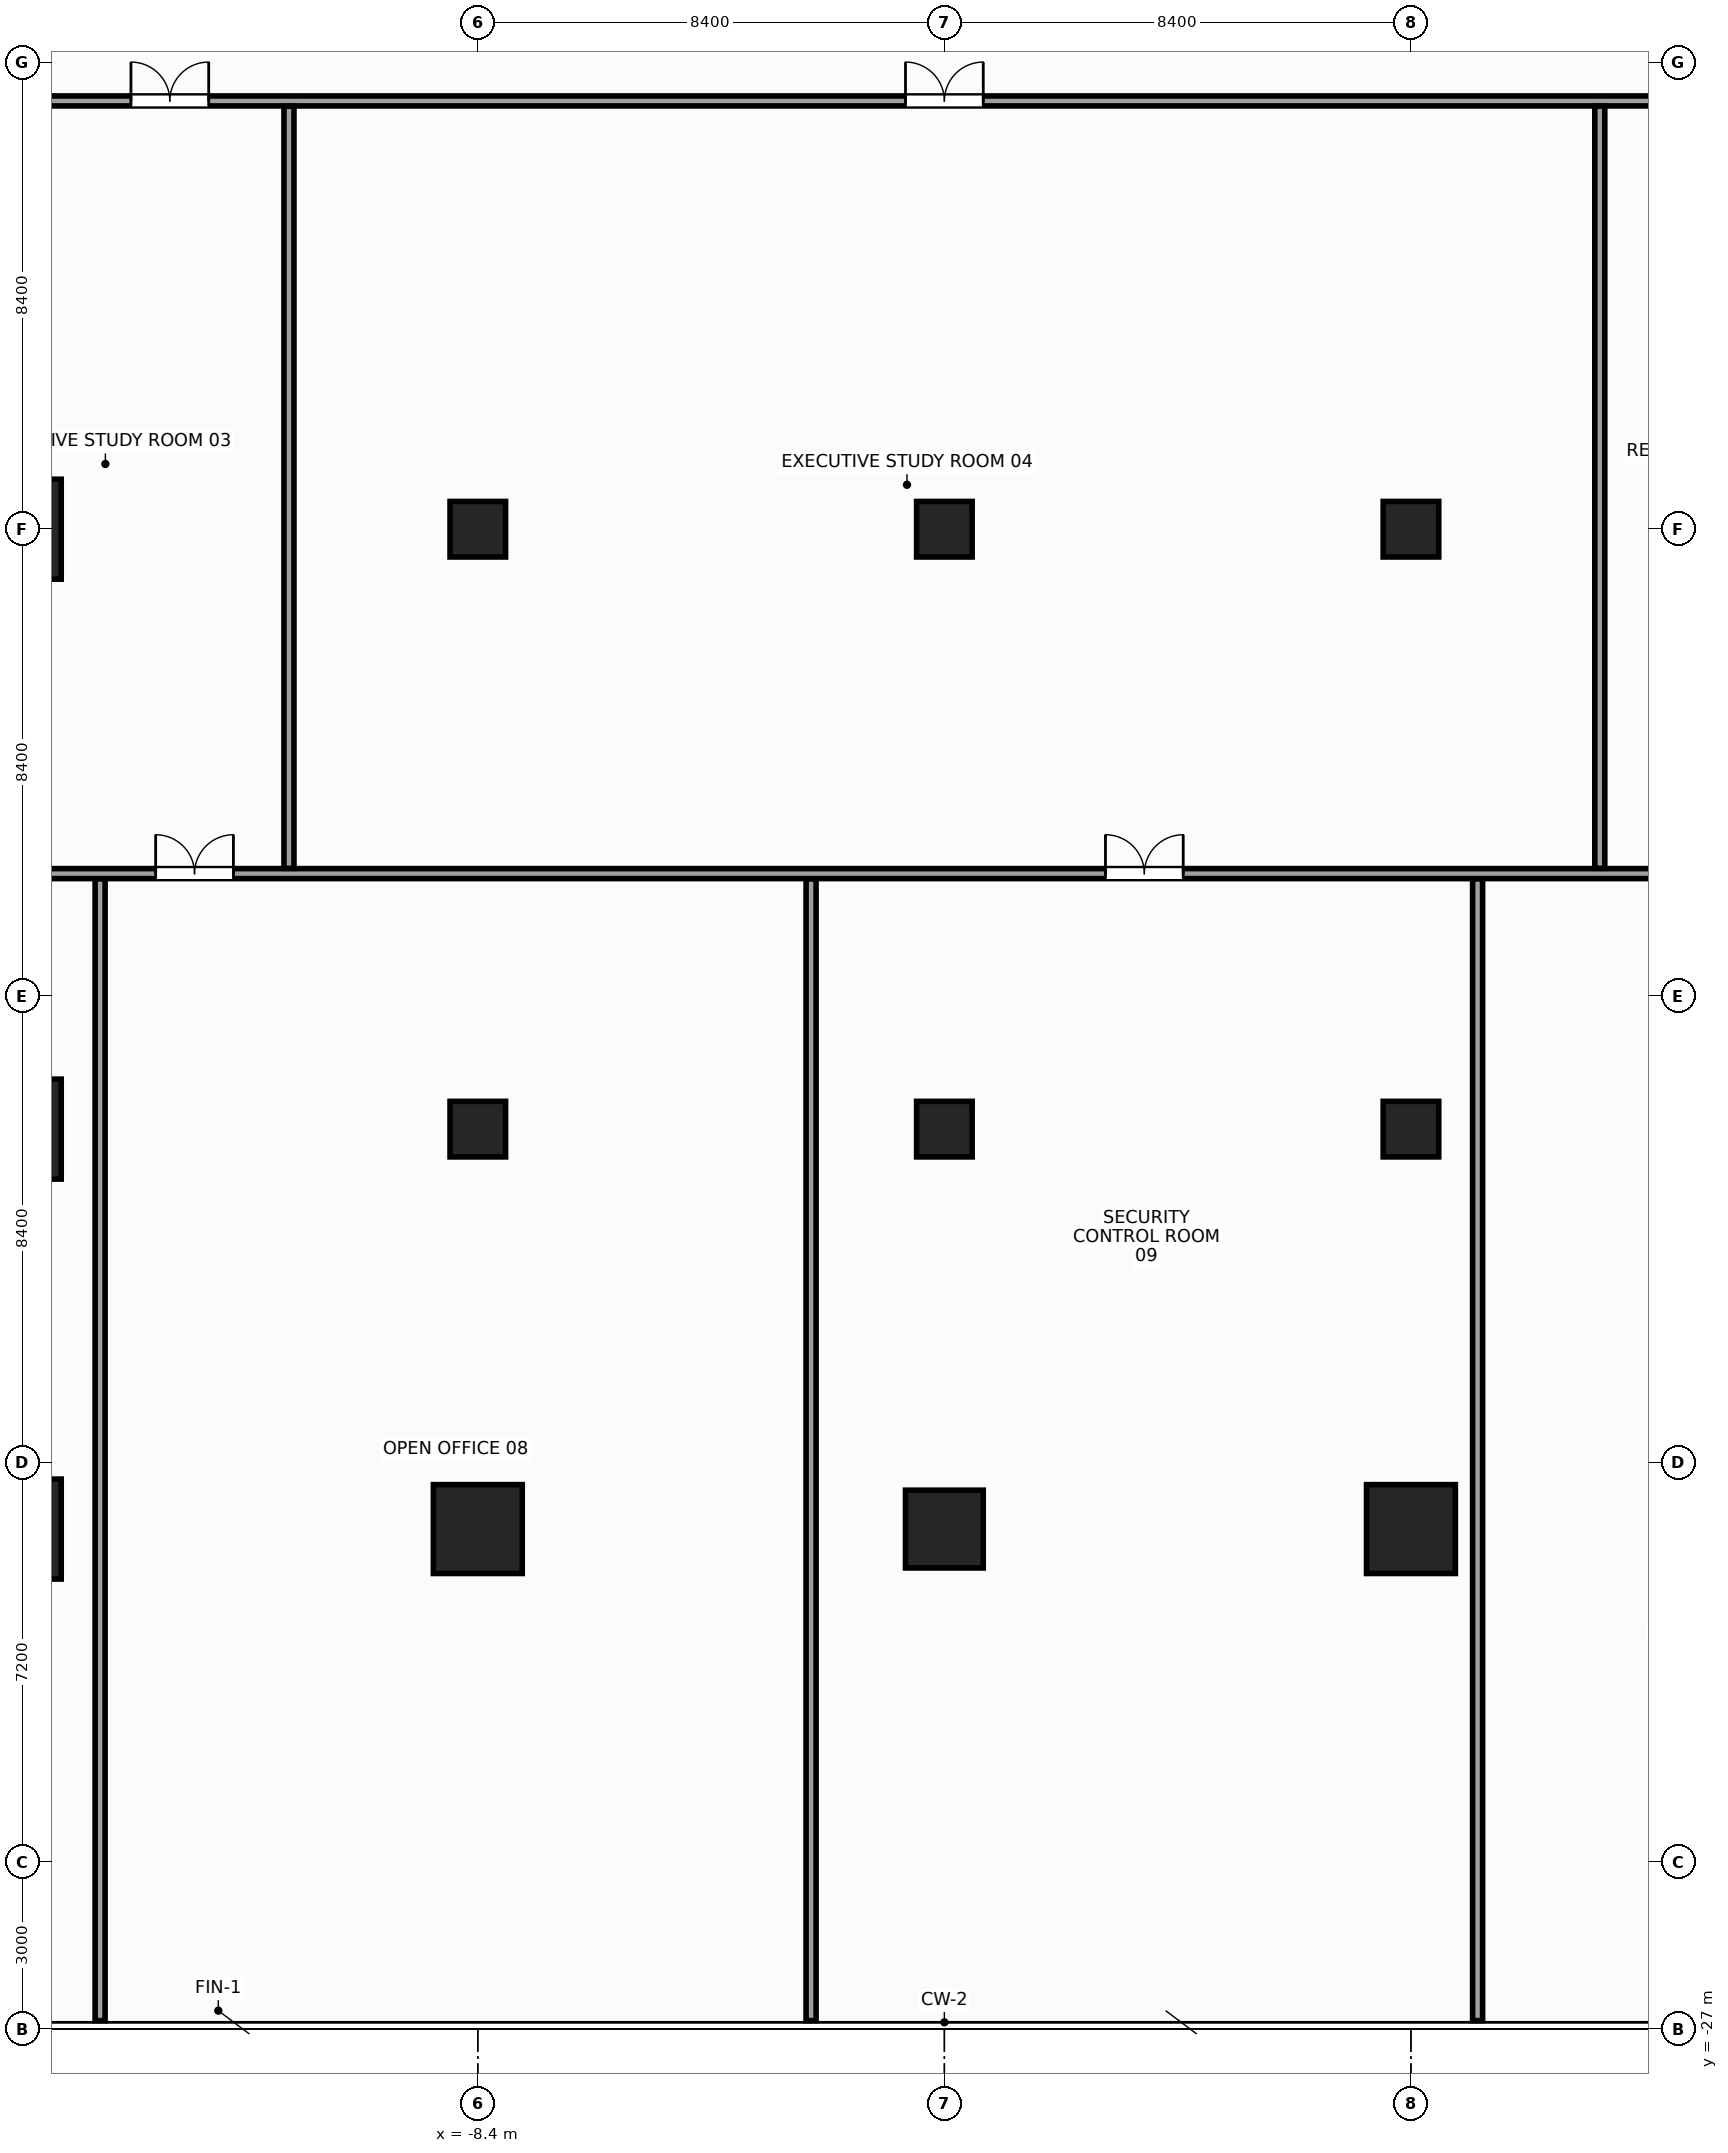
"""IFC4 building model, lengths in metres.
Left out: names, types, materials, properties, quantities, classifications, styles, units other than length and angle.
Written with IfcOpenShell. Run it as: python <this file> out.ifc"""

import sys

from ifc_helpers import new_model, si_unit, direction, frame, frame_2d, origin, origin_2d, place, context, subcontext, project, spatial, rectangle, hollow_rectangle, extrude, source, transform, mapped, element, fill, save


model = new_model("IFC4")
c1 = context("Model", 3, precision=1e-05, world=origin(), true_north=direction((0.0, 1.0)))
c2 = subcontext(c1, "Body", "Model", "MODEL_VIEW")
j1 = project(units=[si_unit("LENGTHUNIT", "METRE"), si_unit("PLANEANGLEUNIT", "RADIAN")], contexts=[c1])
p1 = place(None, origin())
s1 = spatial("IfcSite", under=j1, at=p1, CompositionType="ELEMENT")
p2 = place(p1, origin())
s2 = spatial("IfcBuilding", under=s1, at=p2, CompositionType="ELEMENT")
p3 = place(p2, frame((0.0, 0.0, 66.8)))
s3 = spatial("IfcBuildingStorey", under=s2, at=p3, CompositionType="ELEMENT", Elevation=66.8)
m1 = source(origin(), c2, "Body", "SweptSolid", [
    extrude(rectangle(XDim=1.8, YDim=1.8, at=origin_2d()), origin(), (0.0, 0.0, 1.0), 3.6),
])
for number, where, z_axis, x_axis in (
    (1, (-16.8, -18.0, 0.0), (0.0, 0.0, 1.0), (1.0, 0.0, 0.0)),
    (2, (-16.8, -10.8, 0.0), (0.0, 0.0, 1.0), (1.0, 0.0, 0.0)),
    (3, (-16.8, 0.0, 0.0), (0.0, 0.0, 1.0), (1.0, 0.0, 0.0)),
):
    element("IfcColumn", number, at=place(p3, frame(where, z_axis=z_axis, x_axis=x_axis)), inside=s3, PredefinedType="COLUMN", context=c2, shape_type="MappedRepresentation", body=[
        mapped(m1, transform((0.0, 0.0, 0.0), x_axis=(1.0, 0.0, 0.0), y_axis=(0.0, 1.0, 0.0), z_axis=(0.0, 0.0, 1.0), scale=1.0)),
    ])
m2 = source(origin(), c2, "Body", "SweptSolid", [
    extrude(rectangle(XDim=1.6, YDim=1.6, at=origin_2d()), origin(), (0.0, 0.0, 1.0), 3.6),
])
p4 = place(p3, frame((-8.4, -18.0, 0.0), z_axis=(0.0, 0.0, 1.0), x_axis=(1.0, 0.0, 0.0)))
e4 = element("IfcColumn", 4, at=p4, inside=s3, PredefinedType="COLUMN", context=c2, shape_type="MappedRepresentation", body=[
    mapped(m2, transform((0.0, 0.0, 0.0), x_axis=(1.0, 0.0, 0.0), y_axis=(0.0, 1.0, 0.0), z_axis=(0.0, 0.0, 1.0), scale=1.0)),
])
m3 = source(origin(), c2, "Body", "SweptSolid", [
    extrude(hollow_rectangle(XDim=1.0, YDim=1.0, WallThickness=0.045, at=origin_2d()), origin(), (0.0, 0.0, 1.0), 3.6),
])
for number, where, z_axis, x_axis in (
    (5, (-8.4, 0.0, 0.0), (0.0, 0.0, 1.0), (1.0, 0.0, 0.0)),
    (6, (-8.4, -10.8, 0.0), (0.0, 0.0, 1.0), (1.0, 0.0, 0.0)),
):
    element("IfcColumn", number, at=place(p3, frame(where, z_axis=z_axis, x_axis=x_axis)), inside=s3, PredefinedType="COLUMN", context=c2, shape_type="MappedRepresentation", body=[
        mapped(m3, transform((0.0, 0.0, 0.0), x_axis=(1.0, 0.0, 0.0), y_axis=(0.0, 1.0, 0.0), z_axis=(0.0, 0.0, 1.0), scale=1.0)),
    ])
p5 = place(p3, frame((8.4, -18.0, 0.0), z_axis=(0.0, 0.0, 1.0), x_axis=(1.0, 0.0, 0.0)))
e7 = element("IfcColumn", 7, at=p5, inside=s3, PredefinedType="COLUMN", context=c2, shape_type="MappedRepresentation", body=[
    mapped(m2, transform((0.0, 0.0, 0.0), x_axis=(1.0, 0.0, 0.0), y_axis=(0.0, 1.0, 0.0), z_axis=(0.0, 0.0, 1.0), scale=1.0)),
])
for number, where, z_axis, x_axis in (
    (8, (8.4, 0.0, 0.0), (0.0, 0.0, 1.0), (1.0, 0.0, 0.0)),
    (9, (8.4, -10.8, 0.0), (0.0, 0.0, 1.0), (1.0, 0.0, 0.0)),
):
    element("IfcColumn", number, at=place(p3, frame(where, z_axis=z_axis, x_axis=x_axis)), inside=s3, PredefinedType="COLUMN", context=c2, shape_type="MappedRepresentation", body=[
        mapped(m3, transform((0.0, 0.0, 0.0), x_axis=(1.0, 0.0, 0.0), y_axis=(0.0, 1.0, 0.0), z_axis=(0.0, 0.0, 1.0), scale=1.0)),
    ])
m4 = source(origin(), c2, "Body", "SweptSolid", [
    extrude(rectangle(XDim=1.4, YDim=1.4, at=origin_2d()), origin(), (0.0, 0.0, 1.0), 3.6),
])
p6 = place(p3, frame((0.0, -18.0, 0.0), z_axis=(0.0, 0.0, 1.0), x_axis=(1.0, 0.0, 0.0)))
e10 = element("IfcColumn", 10, at=p6, inside=s3, PredefinedType="COLUMN", context=c2, shape_type="MappedRepresentation", body=[
    mapped(m4, transform((0.0, 0.0, 0.0), x_axis=(1.0, 0.0, 0.0), y_axis=(0.0, 1.0, 0.0), z_axis=(0.0, 0.0, 1.0), scale=1.0)),
])
m5 = source(origin(), c2, "Body", "SweptSolid", [
    extrude(rectangle(XDim=1.0, YDim=1.0, at=origin_2d()), origin(), (0.0, 0.0, 1.0), 3.6),
])
for number, where, z_axis, x_axis in (
    (11, (0.0, -10.8, 0.0), (0.0, 0.0, 1.0), (1.0, 0.0, 0.0)),
    (12, (0.0, 0.0, 0.0), (0.0, 0.0, 1.0), (1.0, 0.0, 0.0)),
):
    element("IfcColumn", number, at=place(p3, frame(where, z_axis=z_axis, x_axis=x_axis)), inside=s3, PredefinedType="COLUMN", context=c2, shape_type="MappedRepresentation", body=[
        mapped(m5, transform((0.0, 0.0, 0.0), x_axis=(1.0, 0.0, 0.0), y_axis=(0.0, 1.0, 0.0), z_axis=(0.0, 0.0, 1.0), scale=1.0)),
    ])
m6 = source(origin(), c2, "Body", "SweptSolid", [
    extrude(rectangle(XDim=36.64, YDim=0.18, at=frame_2d((18.32, 0.0))), origin(), (0.0, 0.0, 1.0), 2.685),
])
p7 = place(p3, frame((-18.32, 7.71, 0.0), z_axis=(0.0, 0.0, 1.0), x_axis=(1.0, 0.0, 0.0)))
e13 = element("IfcWall", 13, at=p7, inside=s3, PredefinedType="PARTITIONING", context=c2, shape_type="MappedRepresentation", body=[
    mapped(m6, transform((0.0, 0.0, 0.0), x_axis=(1.0, 0.0, 0.0), y_axis=(0.0, 1.0, 0.0), z_axis=(0.0, 0.0, 1.0), scale=1.0)),
])
p8 = place(p7, frame((3.675, 0.0, 0.0)))
e14 = element("IfcOpeningElement", 14, at=p8, cuts=e13, PredefinedType="OPENING", context=c2, shape_type="SweptSolid", body=[
    extrude(rectangle(XDim=1.4, YDim=2.2, at=frame_2d((0.7, 1.1))), frame((0.0, 0.102, 0.0), z_axis=(0.0, -1.0, 0.0), x_axis=(1.0, 0.0, 0.0)), (0.0, 0.0, 1.0), 0.204),
])
p9 = place(p7, frame((17.62, 0.0, 0.0)))
e15 = element("IfcOpeningElement", 15, at=p9, cuts=e13, PredefinedType="OPENING", context=c2, shape_type="SweptSolid", body=[
    extrude(rectangle(XDim=1.4, YDim=2.2, at=frame_2d((0.7, 1.1))), frame((0.0, 0.102, 0.0), z_axis=(0.0, -1.0, 0.0), x_axis=(1.0, 0.0, 0.0)), (0.0, 0.0, 1.0), 0.204),
])
p10 = place(p7, frame((32.665, 0.0, 0.0)))
e16 = element("IfcOpeningElement", 16, at=p10, cuts=e13, PredefinedType="OPENING", context=c2, shape_type="SweptSolid", body=[
    extrude(rectangle(XDim=1.4, YDim=2.2, at=frame_2d((0.7, 1.1))), frame((0.0, 0.102, 0.0), z_axis=(0.0, -1.0, 0.0), x_axis=(1.0, 0.0, 0.0)), (0.0, 0.0, 1.0), 0.204),
])
m7 = source(origin(), c2, "Body", "SweptSolid", [
    extrude(rectangle(XDim=36.63, YDim=0.18, at=frame_2d((18.315, 0.0))), origin(), (0.0, 0.0, 1.0), 2.685),
])
p11 = place(p3, frame((-18.315, -6.2, 0.0), z_axis=(0.0, 0.0, 1.0), x_axis=(1.0, 0.0, 0.0)))
e17 = element("IfcWall", 17, at=p11, inside=s3, PredefinedType="PARTITIONING", context=c2, shape_type="MappedRepresentation", body=[
    mapped(m7, transform((0.0, 0.0, 0.0), x_axis=(1.0, 0.0, 0.0), y_axis=(0.0, 1.0, 0.0), z_axis=(0.0, 0.0, 1.0), scale=1.0)),
])
p12 = place(p11, frame((4.115, 0.0, 0.0)))
e18 = element("IfcOpeningElement", 18, at=p12, cuts=e17, PredefinedType="OPENING", context=c2, shape_type="SweptSolid", body=[
    extrude(rectangle(XDim=1.4, YDim=2.2, at=frame_2d((0.7, 1.1))), frame((0.0, 0.102, 0.0), z_axis=(0.0, -1.0, 0.0), x_axis=(1.0, 0.0, 0.0)), (0.0, 0.0, 1.0), 0.204),
])
p13 = place(p11, frame((21.215, 0.0, 0.0)))
e19 = element("IfcOpeningElement", 19, at=p13, cuts=e17, PredefinedType="OPENING", context=c2, shape_type="SweptSolid", body=[
    extrude(rectangle(XDim=1.4, YDim=2.2, at=frame_2d((0.7, 1.1))), frame((0.0, 0.102, 0.0), z_axis=(0.0, -1.0, 0.0), x_axis=(1.0, 0.0, 0.0)), (0.0, 0.0, 1.0), 0.204),
])
m8 = source(origin(), c2, "Body", "SweptSolid", [
    extrude(rectangle(XDim=13.72, YDim=0.18, at=frame_2d((6.86, 0.0))), origin(), (0.0, 0.0, 1.0), 2.585),
])
for number, where, z_axis, x_axis in (
    (20, (-11.8, -6.105, 0.0), (0.0, 0.0, 1.0), (0.0, 1.0, 0.0)),
    (21, (11.8, -6.105, 0.0), (0.0, 0.0, 1.0), (0.0, 1.0, 0.0)),
):
    element("IfcWall", number, at=place(p3, frame(where, z_axis=z_axis, x_axis=x_axis)), inside=s3, PredefinedType="PARTITIONING", context=c2, shape_type="MappedRepresentation", body=[
        mapped(m8, transform((0.0, 0.0, 0.0), x_axis=(1.0, 0.0, 0.0), y_axis=(0.0, 1.0, 0.0), z_axis=(0.0, 0.0, 1.0), scale=1.0)),
    ])
m9 = source(origin(), c2, "Body", "SweptSolid", [
    extrude(rectangle(XDim=20.555, YDim=0.18, at=frame_2d((10.278, 0.0))), origin(), (0.0, 0.0, 1.0), 2.685),
])
for number, where, z_axis, x_axis in (
    (22, (-15.2, -26.85, 0.0), (0.0, 0.0, 1.0), (0.0, 1.0, 0.0)),
    (23, (-2.4, -26.85, 0.0), (0.0, 0.0, 1.0), (0.0, 1.0, 0.0)),
    (24, (9.6, -26.85, 0.0), (0.0, 0.0, 1.0), (0.0, 1.0, 0.0)),
):
    element("IfcWall", number, at=place(p3, frame(where, z_axis=z_axis, x_axis=x_axis)), inside=s3, PredefinedType="PARTITIONING", context=c2, shape_type="MappedRepresentation", body=[
        mapped(m9, transform((0.0, 0.0, 0.0), x_axis=(1.0, 0.0, 0.0), y_axis=(0.0, 1.0, 0.0), z_axis=(0.0, 0.0, 1.0), scale=1.0)),
    ])
m10 = source(origin(), c2, "Body", "SweptSolid", [
    extrude(rectangle(XDim=1.4, YDim=2.2, at=frame_2d((0.7, 1.1))), frame((0.0, 0.025, 0.0), z_axis=(0.0, -1.0, 0.0), x_axis=(1.0, 0.0, 0.0)), (0.0, 0.0, 1.0), 0.05),
])
p14 = place(p8, origin())
e25 = element("IfcDoor", 25, at=p14, inside=s3, OperationType="DOUBLE_DOOR_SINGLE_SWING", PredefinedType="DOOR", context=c2, shape_type="MappedRepresentation", body=[
    mapped(m10, transform((0.0, 0.0, 0.0), x_axis=(1.0, 0.0, 0.0), y_axis=(0.0, 1.0, 0.0), z_axis=(0.0, 0.0, 1.0), scale=1.0)),
])
fill(e14, e25)
p15 = place(p9, origin())
e26 = element("IfcDoor", 26, at=p15, inside=s3, OperationType="DOUBLE_DOOR_SINGLE_SWING", PredefinedType="DOOR", context=c2, shape_type="MappedRepresentation", body=[
    mapped(m10, transform((0.0, 0.0, 0.0), x_axis=(1.0, 0.0, 0.0), y_axis=(0.0, 1.0, 0.0), z_axis=(0.0, 0.0, 1.0), scale=1.0)),
])
fill(e15, e26)
p16 = place(p12, origin())
e27 = element("IfcDoor", 27, at=p16, inside=s3, OperationType="DOUBLE_DOOR_SINGLE_SWING", PredefinedType="DOOR", context=c2, shape_type="MappedRepresentation", body=[
    mapped(m10, transform((0.0, 0.0, 0.0), x_axis=(1.0, 0.0, 0.0), y_axis=(0.0, 1.0, 0.0), z_axis=(0.0, 0.0, 1.0), scale=1.0)),
])
fill(e18, e27)
p17 = place(p13, origin())
e28 = element("IfcDoor", 28, at=p17, inside=s3, OperationType="DOUBLE_DOOR_SINGLE_SWING", PredefinedType="DOOR", context=c2, shape_type="MappedRepresentation", body=[
    mapped(m10, transform((0.0, 0.0, 0.0), x_axis=(1.0, 0.0, 0.0), y_axis=(0.0, 1.0, 0.0), z_axis=(0.0, 0.0, 1.0), scale=1.0)),
])
fill(e19, e28)
save(model, sys.argv[1])
